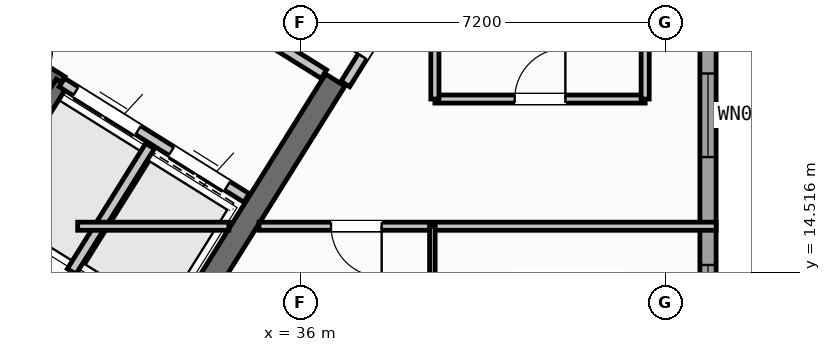
"""IFC4 building model, lengths in metres.
Left out: names, types, materials, properties, quantities, classifications, styles, units other than length and angle.
Written with IfcOpenShell. Run it as: python <this file> out.ifc"""

import sys

from ifc_helpers import new_model, si_unit, direction, frame, frame_2d, origin, place, context, subcontext, project, spatial, rectangle, extrude, source, transform, mapped, element, fill, save


model = new_model("IFC4")
c1 = context("Model", 3, precision=1e-05, world=origin(), true_north=direction((0.0, 1.0)))
c2 = subcontext(c1, "Body", "Model", "MODEL_VIEW")
j1 = project(units=[si_unit("LENGTHUNIT", "METRE"), si_unit("PLANEANGLEUNIT", "RADIAN")], contexts=[c1])
p1 = place(None, origin())
s1 = spatial("IfcSite", under=j1, at=p1, CompositionType="ELEMENT")
p2 = place(p1, origin())
s2 = spatial("IfcBuilding", under=s1, at=p2, CompositionType="ELEMENT")
p3 = place(p2, frame((0.0, 0.0, 284.4)))
s3 = spatial("IfcBuildingStorey", under=s2, at=p3, CompositionType="ELEMENT", Elevation=284.4)
p4 = place(p3, frame((33.324, 12.503, 0.0), z_axis=(0.0, 0.0, 1.0), x_axis=(-0.848043529849, 0.529926571782, 0.0)))
e1 = element("IfcWall", 1, at=p4, inside=s3, PredefinedType="SHEAR", context=c2, shape_type="SweptSolid", body=[
    extrude(rectangle(XDim=13.04, YDim=0.45, at=frame_2d((6.52, 0.0))), origin(), (0.0, 0.0, 1.0), 3.35),
])
p5 = place(p3, frame((36.683, 18.304, 0.0), z_axis=(0.0, 0.0, 1.0), x_axis=(-0.529904039071, -0.848057609704, 0.0)))
e2 = element("IfcWall", 2, at=p5, inside=s3, PredefinedType="SHEAR", context=c2, shape_type="SweptSolid", body=[
    extrude(rectangle(XDim=6.475, YDim=0.45, at=frame_2d((3.238, 0.0))), origin(), (0.0, 0.0, 1.0), 3.35),
])
p6 = place(p3, frame((44.04, 23.04, 0.0), z_axis=(0.0, 0.0, 1.0), x_axis=(0.0, -1.0, 0.0)))
e3 = element("IfcWall", 3, at=p6, inside=s3, PredefinedType="STANDARD", context=c2, shape_type="SweptSolid", body=[
    extrude(rectangle(XDim=21.08, YDim=0.32, at=frame_2d((10.54, 0.0))), origin(), (0.0, 0.0, 1.0), 3.35),
])
p7 = place(p6, frame((1.285, 0.0, 0.9)))
e4 = element("IfcOpeningElement", 4, at=p7, cuts=e3, PredefinedType="OPENING", context=c2, shape_type="SweptSolid", body=[
    extrude(rectangle(XDim=1.65, YDim=1.45, at=frame_2d((0.825, 0.725))), frame((0.0, 0.17, 0.0), z_axis=(0.0, -1.0, 0.0), x_axis=(1.0, 0.0, 0.0)), (0.0, 0.0, 1.0), 0.34),
])
p8 = place(p6, frame((4.605, 0.0, 0.9)))
e5 = element("IfcOpeningElement", 5, at=p8, cuts=e3, PredefinedType="OPENING", context=c2, shape_type="SweptSolid", body=[
    extrude(rectangle(XDim=1.65, YDim=1.45, at=frame_2d((0.825, 0.725))), frame((0.0, 0.17, 0.0), z_axis=(0.0, -1.0, 0.0), x_axis=(1.0, 0.0, 0.0)), (0.0, 0.0, 1.0), 0.34),
])
p9 = place(p6, frame((8.385, 0.0, 0.95)))
e6 = element("IfcOpeningElement", 6, at=p9, cuts=e3, PredefinedType="OPENING", context=c2, shape_type="SweptSolid", body=[
    extrude(rectangle(XDim=1.95, YDim=1.35, at=frame_2d((0.975, 0.675))), frame((0.0, 0.17, 0.0), z_axis=(0.0, -1.0, 0.0), x_axis=(1.0, 0.0, 0.0)), (0.0, 0.0, 1.0), 0.34),
])
p10 = place(p6, frame((12.354, 0.0, 1.0)))
e7 = element("IfcOpeningElement", 7, at=p10, cuts=e3, PredefinedType="OPENING", context=c2, shape_type="SweptSolid", body=[
    extrude(rectangle(XDim=0.9, YDim=1.25, at=frame_2d((0.45, 0.625))), frame((0.0, 0.17, 0.0), z_axis=(0.0, -1.0, 0.0), x_axis=(1.0, 0.0, 0.0)), (0.0, 0.0, 1.0), 0.34),
])
p11 = place(p6, frame((14.741, 0.0, 1.0)))
e8 = element("IfcOpeningElement", 8, at=p11, cuts=e3, PredefinedType="OPENING", context=c2, shape_type="SweptSolid", body=[
    extrude(rectangle(XDim=0.9, YDim=1.25, at=frame_2d((0.45, 0.625))), frame((0.0, 0.17, 0.0), z_axis=(0.0, -1.0, 0.0), x_axis=(1.0, 0.0, 0.0)), (0.0, 0.0, 1.0), 0.34),
])
p12 = place(p6, frame((18.337, 0.0, 0.9)))
e9 = element("IfcOpeningElement", 9, at=p12, cuts=e3, PredefinedType="OPENING", context=c2, shape_type="SweptSolid", body=[
    extrude(rectangle(XDim=1.35, YDim=1.45, at=frame_2d((0.675, 0.725))), frame((0.0, 0.17, 0.0), z_axis=(0.0, -1.0, 0.0), x_axis=(1.0, 0.0, 0.0)), (0.0, 0.0, 1.0), 0.34),
])
p13 = place(p3, frame((31.28, 18.261, 0.0), z_axis=(0.0, 0.0, 1.0), x_axis=(-0.848051618787, 0.529913626805, 0.0)))
e10 = element("IfcWall", 10, at=p13, inside=s3, PredefinedType="SHEAR", context=c2, shape_type="SweptSolid", body=[
    extrude(rectangle(XDim=7.46, YDim=0.26, at=frame_2d((3.73, 0.0))), origin(), (0.0, 0.0, 1.0), 3.35),
])
p14 = place(p13, frame((0.36, 0.0, 0.0)))
e11 = element("IfcOpeningElement", 11, at=p14, cuts=e10, PredefinedType="OPENING", context=c2, shape_type="SweptSolid", body=[
    extrude(rectangle(XDim=0.86, YDim=2.05, at=frame_2d((0.43, 1.025))), frame((0.0, 0.14, 0.0), z_axis=(0.0, -1.0, 0.0), x_axis=(1.0, 0.0, 0.0)), (0.0, 0.0, 1.0), 0.28),
])
p15 = place(p3, frame((31.288, 18.256, 0.0), z_axis=(0.0, 0.0, 1.0), x_axis=(-0.529943379326, -0.848033026897, 0.0)))
e12 = element("IfcWall", 12, at=p15, inside=s3, PredefinedType="SHEAR", context=c2, shape_type="SweptSolid", body=[
    extrude(rectangle(XDim=3.16, YDim=0.26, at=frame_2d((1.58, 0.0))), origin(), (0.0, 0.0, 1.0), 3.35),
])
p16 = place(p3, frame((34.933, 15.978, 0.0), z_axis=(0.0, 0.0, 1.0), x_axis=(-0.848055739377, 0.529907032327, 0.0)))
e13 = element("IfcWall", 13, at=p16, inside=s3, PredefinedType="STANDARD", context=c2, shape_type="SweptSolid", body=[
    extrude(rectangle(XDim=4.298, YDim=0.2, at=frame_2d((2.149, 0.0))), origin(), (0.0, 0.0, 1.0), 3.34),
])
p17 = place(p16, frame((0.448, 0.0, 0.0)))
e14 = element("IfcOpeningElement", 14, at=p17, cuts=e13, PredefinedType="OPENING", context=c2, shape_type="SweptSolid", body=[
    extrude(rectangle(XDim=1.3, YDim=2.2, at=frame_2d((0.65, 1.1))), frame((0.0, 0.11, 0.0), z_axis=(0.0, -1.0, 0.0), x_axis=(1.0, 0.0, 0.0)), (0.0, 0.0, 1.0), 0.22),
])
p18 = place(p16, frame((2.523, 0.0, 0.0)))
e15 = element("IfcOpeningElement", 15, at=p18, cuts=e13, PredefinedType="OPENING", context=c2, shape_type="SweptSolid", body=[
    extrude(rectangle(XDim=1.45, YDim=2.25, at=frame_2d((0.725, 1.125))), frame((0.0, 0.11, 0.0), z_axis=(0.0, -1.0, 0.0), x_axis=(1.0, 0.0, 0.0)), (0.0, 0.0, 1.0), 0.22),
])
p19 = place(p3, frame((36.459, 18.421, 0.0), z_axis=(0.0, 0.0, 1.0), x_axis=(-0.848059591691, 0.529900867089, 0.0)))
e16 = element("IfcWall", 16, at=p19, inside=s3, PredefinedType="STANDARD", context=c2, shape_type="SweptSolid", body=[
    extrude(rectangle(XDim=5.818, YDim=0.2, at=frame_2d((2.909, 0.0))), origin(), (0.0, 0.0, 1.0), 3.34),
])
p20 = place(p19, frame((2.598, 0.0, 0.0)))
e17 = element("IfcOpeningElement", 17, at=p20, cuts=e16, PredefinedType="OPENING", context=c2, shape_type="SweptSolid", body=[
    extrude(rectangle(XDim=1.15, YDim=2.1, at=frame_2d((0.575, 1.05))), frame((0.0, 0.11, 0.0), z_axis=(0.0, -1.0, 0.0), x_axis=(1.0, 0.0, 0.0)), (0.0, 0.0, 1.0), 0.22),
])
p21 = place(p3, frame((33.029, 17.003, 0.0), z_axis=(0.0, 0.0, 1.0), x_axis=(-0.529916267533, -0.848049968695, 0.0)))
e18 = element("IfcWall", 18, at=p21, inside=s3, PredefinedType="STANDARD", context=c2, shape_type="SweptSolid", body=[
    extrude(rectangle(XDim=2.92, YDim=0.2, at=frame_2d((1.46, 0.0))), origin(), (0.0, 0.0, 1.0), 3.34),
])
p22 = place(p3, frame((32.164, 10.374, 0.0), z_axis=(0.0, 0.0, 1.0), x_axis=(-0.848044107957, 0.529925646633, 0.0)))
e19 = element("IfcWall", 19, at=p22, inside=s3, PredefinedType="PARTITIONING", context=c2, shape_type="SweptSolid", body=[
    extrude(rectangle(XDim=15.57, YDim=0.16, at=frame_2d((7.785, 0.0))), origin(), (0.0, 0.0, 1.0), 3.34),
])
p23 = place(p22, frame((10.83, 0.0, 0.0)))
e20 = element("IfcOpeningElement", 20, at=p23, cuts=e19, PredefinedType="OPENING", context=c2, shape_type="SweptSolid", body=[
    extrude(rectangle(XDim=1.0, YDim=2.1, at=frame_2d((0.5, 1.05))), frame((0.0, 0.09, 0.0), z_axis=(0.0, -1.0, 0.0), x_axis=(1.0, 0.0, 0.0)), (0.0, 0.0, 1.0), 0.18),
])
p24 = place(p3, frame((38.451, 20.737, 0.0), z_axis=(0.0, 0.0, 1.0), x_axis=(-0.529924799939, -0.848044637038, 0.0)))
e21 = element("IfcWall", 21, at=p24, inside=s3, PredefinedType="STANDARD", context=c2, shape_type="SweptSolid", body=[
    extrude(rectangle(XDim=2.96, YDim=0.2, at=frame_2d((1.48, 0.0))), origin(), (0.0, 0.0, 1.0), 3.34),
])
p25 = place(p24, frame((1.46, 0.0, 0.0)))
e22 = element("IfcOpeningElement", 22, at=p25, cuts=e21, PredefinedType="OPENING", context=c2, shape_type="SweptSolid", body=[
    extrude(rectangle(XDim=0.86, YDim=2.05, at=frame_2d((0.43, 1.025))), frame((0.0, 0.11, 0.0), z_axis=(0.0, -1.0, 0.0), x_axis=(1.0, 0.0, 0.0)), (0.0, 0.0, 1.0), 0.22),
])
p26 = place(p3, frame((31.6, 15.42, 0.0), z_axis=(0.0, 0.0, 1.0), x_axis=(1.0, 0.0, 0.0)))
e23 = element("IfcWall", 23, at=p26, inside=s3, PredefinedType="PARTITIONING", context=c2, shape_type="SweptSolid", body=[
    extrude(rectangle(XDim=2.984, YDim=0.16, at=frame_2d((1.492, 0.0))), origin(), (0.0, 0.0, 1.0), 3.34),
])
p27 = place(p3, frame((35.178, 15.42, 0.0), z_axis=(0.0, 0.0, 1.0), x_axis=(1.0, 0.0, 0.0)))
e24 = element("IfcWall", 24, at=p27, inside=s3, PredefinedType="PARTITIONING", context=c2, shape_type="SweptSolid", body=[
    extrude(rectangle(XDim=9.021, YDim=0.16, at=frame_2d((4.511, 0.0))), origin(), (0.0, 0.0, 1.0), 3.34),
])
p28 = place(p27, frame((1.422, 0.0, 0.0)))
e25 = element("IfcOpeningElement", 25, at=p28, cuts=e24, PredefinedType="OPENING", context=c2, shape_type="SweptSolid", body=[
    extrude(rectangle(XDim=1.0, YDim=2.1, at=frame_2d((0.5, 1.05))), frame((0.0, 0.09, 0.0), z_axis=(0.0, -1.0, 0.0), x_axis=(1.0, 0.0, 0.0)), (0.0, 0.0, 1.0), 0.18),
])
p29 = place(p3, frame((38.65, 17.93, 0.0), z_axis=(0.0, 0.0, 1.0), x_axis=(1.0, 0.0, 0.0)))
e26 = element("IfcWall", 26, at=p29, inside=s3, PredefinedType="PARTITIONING", context=c2, shape_type="SweptSolid", body=[
    extrude(rectangle(XDim=4.15, YDim=0.16, at=frame_2d((2.075, 0.0))), origin(), (0.0, 0.0, 1.0), 3.34),
])
p30 = place(p29, frame((1.575, 0.0, 0.0)))
e27 = element("IfcOpeningElement", 27, at=p30, cuts=e26, PredefinedType="OPENING", context=c2, shape_type="SweptSolid", body=[
    extrude(rectangle(XDim=1.0, YDim=2.1, at=frame_2d((0.5, 1.05))), frame((0.0, 0.09, 0.0), z_axis=(0.0, -1.0, 0.0), x_axis=(1.0, 0.0, 0.0)), (0.0, 0.0, 1.0), 0.18),
])
p31 = place(p3, frame((38.65, 17.93, 0.0), z_axis=(0.0, 0.0, 1.0), x_axis=(0.0, 1.0, 0.0)))
e28 = element("IfcWall", 28, at=p31, inside=s3, PredefinedType="PARTITIONING", context=c2, shape_type="SweptSolid", body=[
    extrude(rectangle(XDim=3.046, YDim=0.16, at=frame_2d((1.523, 0.0))), origin(), (0.0, 0.0, 1.0), 3.34),
])
p32 = place(p3, frame((42.8, 17.93, 0.0), z_axis=(0.0, 0.0, 1.0), x_axis=(0.0, 1.0, 0.0)))
e29 = element("IfcWall", 29, at=p32, inside=s3, PredefinedType="PARTITIONING", context=c2, shape_type="SweptSolid", body=[
    extrude(rectangle(XDim=3.57, YDim=0.16, at=frame_2d((1.785, 0.0))), origin(), (0.0, 0.0, 1.0), 3.34),
])
p33 = place(p3, frame((38.6, 1.96, 0.0), z_axis=(0.0, 0.0, 1.0), x_axis=(0.0, 1.0, 0.0)))
e30 = element("IfcWall", 30, at=p33, inside=s3, PredefinedType="PARTITIONING", context=c2, shape_type="SweptSolid", body=[
    extrude(rectangle(XDim=13.46, YDim=0.11, at=frame_2d((6.73, 0.0))), origin(), (0.0, 0.0, 1.0), 3.34),
])
p34 = place(p33, frame((5.2, 0.0, 0.0)))
e31 = element("IfcOpeningElement", 31, at=p34, cuts=e30, PredefinedType="OPENING", context=c2, shape_type="SweptSolid", body=[
    extrude(rectangle(XDim=0.92, YDim=2.08, at=frame_2d((0.46, 1.04))), frame((0.0, 0.065, 0.0), z_axis=(0.0, -1.0, 0.0), x_axis=(1.0, 0.0, 0.0)), (0.0, 0.0, 1.0), 0.13),
])
p35 = place(p33, frame((10.45, 0.0, 0.0)))
e32 = element("IfcOpeningElement", 32, at=p35, cuts=e30, PredefinedType="OPENING", context=c2, shape_type="SweptSolid", body=[
    extrude(rectangle(XDim=0.88, YDim=2.08, at=frame_2d((0.44, 1.04))), frame((0.0, 0.065, 0.0), z_axis=(0.0, -1.0, 0.0), x_axis=(1.0, 0.0, 0.0)), (0.0, 0.0, 1.0), 0.13),
])
m1 = source(origin(), c2, "Body", "SweptSolid", [
    extrude(rectangle(XDim=1.65, YDim=1.45, at=frame_2d((0.825, 0.725))), frame((0.0, 0.03, 0.0), z_axis=(0.0, -1.0, 0.0), x_axis=(1.0, 0.0, 0.0)), (0.0, 0.0, 1.0), 0.06),
])
p36 = place(p8, origin())
e33 = element("IfcWindow", 33, at=p36, inside=s3, PartitioningType="SINGLE_PANEL", PredefinedType="WINDOW", context=c2, shape_type="MappedRepresentation", body=[
    mapped(m1, transform((0.0, 0.0, 0.0), scale=1.0)),
])
fill(e5, e33)
m2 = source(origin(), c2, "Body", "SweptSolid", [
    extrude(rectangle(XDim=1.95, YDim=1.35, at=frame_2d((0.975, 0.675))), frame((0.0, 0.03, 0.0), z_axis=(0.0, -1.0, 0.0), x_axis=(1.0, 0.0, 0.0)), (0.0, 0.0, 1.0), 0.06),
])
p37 = place(p9, origin())
e34 = element("IfcWindow", 34, at=p37, inside=s3, PartitioningType="SINGLE_PANEL", PredefinedType="WINDOW", context=c2, shape_type="MappedRepresentation", body=[
    mapped(m2, transform((0.0, 0.0, 0.0), scale=1.0)),
])
fill(e6, e34)
m3 = source(origin(), c2, "Body", "SweptSolid", [
    extrude(rectangle(XDim=1.3, YDim=2.2, at=frame_2d((0.65, 1.1))), frame((0.0, 0.025, 0.0), z_axis=(0.0, -1.0, 0.0), x_axis=(1.0, 0.0, 0.0)), (0.0, 0.0, 1.0), 0.05),
])
p38 = place(p17, origin())
e35 = element("IfcDoor", 35, at=p38, inside=s3, OperationType="DOUBLE_DOOR_SLIDING", PredefinedType="DOOR", context=c2, shape_type="MappedRepresentation", body=[
    mapped(m3, transform((0.0, 0.0, 0.0), scale=1.0)),
])
fill(e14, e35)
m4 = source(origin(), c2, "Body", "SweptSolid", [
    extrude(rectangle(XDim=1.45, YDim=2.25, at=frame_2d((0.725, 1.125))), frame((0.0, 0.025, 0.0), z_axis=(0.0, -1.0, 0.0), x_axis=(1.0, 0.0, 0.0)), (0.0, 0.0, 1.0), 0.05),
])
p39 = place(p18, origin())
e36 = element("IfcDoor", 36, at=p39, inside=s3, OperationType="DOUBLE_DOOR_SLIDING", PredefinedType="DOOR", context=c2, shape_type="MappedRepresentation", body=[
    mapped(m4, transform((0.0, 0.0, 0.0), scale=1.0)),
])
fill(e15, e36)
m5 = source(origin(), c2, "Body", "SweptSolid", [
    extrude(rectangle(XDim=1.0, YDim=2.1, at=frame_2d((0.5, 1.05))), frame((0.0, 0.025, 0.0), z_axis=(0.0, -1.0, 0.0), x_axis=(1.0, 0.0, 0.0)), (0.0, 0.0, 1.0), 0.05),
])
p40 = place(p30, origin())
e37 = element("IfcDoor", 37, at=p40, inside=s3, OperationType="SINGLE_SWING_RIGHT", PredefinedType="DOOR", context=c2, shape_type="MappedRepresentation", body=[
    mapped(m5, transform((0.0, 0.0, 0.0), scale=1.0)),
])
fill(e27, e37)
m6 = source(origin(), c2, "Body", "SweptSolid", [
    extrude(rectangle(XDim=0.86, YDim=2.05, at=frame_2d((0.43, 1.025))), frame((0.0, 0.025, 0.0), z_axis=(0.0, -1.0, 0.0), x_axis=(1.0, 0.0, 0.0)), (0.0, 0.0, 1.0), 0.05),
])
p41 = place(p25, frame((0.86, 0.0, 0.0), z_axis=(0.0, 0.0, 1.0), x_axis=(-1.0, 0.0, 0.0)))
e38 = element("IfcDoor", 38, at=p41, inside=s3, OperationType="SINGLE_SWING_LEFT", PredefinedType="DOOR", context=c2, shape_type="MappedRepresentation", body=[
    mapped(m6, transform((0.0, 0.0, 0.0), scale=1.0)),
])
fill(e22, e38)
p42 = place(p28, frame((1.0, 0.0, 0.0), z_axis=(0.0, 0.0, 1.0), x_axis=(-1.0, 0.0, 0.0)))
e39 = element("IfcDoor", 39, at=p42, inside=s3, OperationType="SINGLE_SWING_LEFT", PredefinedType="DOOR", context=c2, shape_type="MappedRepresentation", body=[
    mapped(m5, transform((0.0, 0.0, 0.0), scale=1.0)),
])
fill(e25, e39)
save(model, sys.argv[1])
